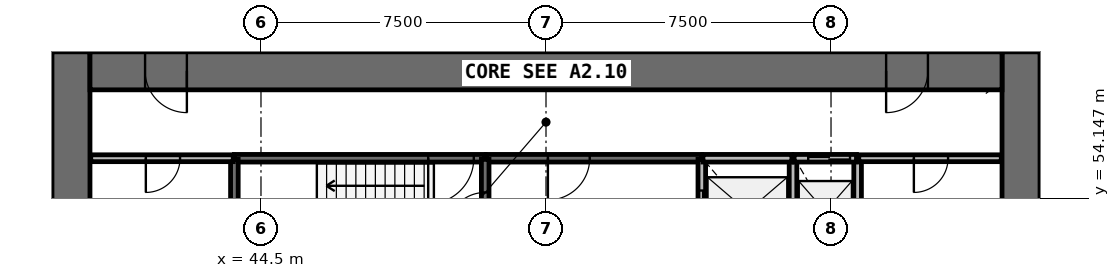
"""IFC4 building model, lengths in metres.
Left out: names, types, materials, properties, quantities, classifications, styles, units other than length and angle.
Written with IfcOpenShell. Run it as: python <this file> out.ifc"""

import sys

from ifc_helpers import new_model, si_unit, direction, frame, frame_2d, origin, place, context, subcontext, project, spatial, rectangle, extrude, source, transform, mapped, element, fill, save


model = new_model("IFC4")
c1 = context("Model", 3, precision=1e-05, world=origin(), true_north=direction((0.0, 1.0)))
c2 = subcontext(c1, "Body", "Model", "MODEL_VIEW")
j1 = project(units=[si_unit("LENGTHUNIT", "METRE"), si_unit("PLANEANGLEUNIT", "RADIAN")], contexts=[c1])
p1 = place(None, origin())
s1 = spatial("IfcSite", under=j1, at=p1, CompositionType="ELEMENT")
p2 = place(p1, origin())
s2 = spatial("IfcBuilding", under=s1, at=p2, CompositionType="ELEMENT")
p3 = place(p2, frame((0.0, 0.0, 40.2)))
s3 = spatial("IfcBuildingStorey", under=s2, at=p3, CompositionType="ELEMENT", Elevation=40.2)
p4 = place(p3, frame((64.5, 38.0, 0.0), z_axis=(0.0, 0.0, 1.0), x_axis=(0.0, 1.0, 0.0)))
e1 = element("IfcWall", 1, at=p4, inside=s3, PredefinedType="SHEAR", context=c2, shape_type="SweptSolid", body=[
    extrude(rectangle(XDim=20.0, YDim=1.0, at=frame_2d((10.0, 0.0))), origin(), (0.0, 0.0, 1.0), 4.4),
])
p5 = place(p4, frame((9.1, 0.0, 0.0)))
e2 = element("IfcOpeningElement", 2, at=p5, cuts=e1, PredefinedType="OPENING", context=c2, shape_type="SweptSolid", body=[
    extrude(rectangle(XDim=1.8, YDim=2.1, at=frame_2d((0.9, 1.05))), frame((0.0, 0.51, 0.0), z_axis=(0.0, -1.0, 0.0), x_axis=(1.0, 0.0, 0.0)), (0.0, 0.0, 1.0), 1.02),
])
p6 = place(p3, frame((39.5, 58.0, 0.0), z_axis=(0.0, 0.0, 1.0), x_axis=(0.0, -1.0, 0.0)))
e3 = element("IfcWall", 3, at=p6, inside=s3, PredefinedType="SHEAR", context=c2, shape_type="SweptSolid", body=[
    extrude(rectangle(XDim=20.0, YDim=1.0, at=frame_2d((10.0, 0.0))), origin(), (0.0, 0.0, 1.0), 4.4),
])
p7 = place(p6, frame((9.1, 0.0, 0.0)))
e4 = element("IfcOpeningElement", 4, at=p7, cuts=e3, PredefinedType="OPENING", context=c2, shape_type="SweptSolid", body=[
    extrude(rectangle(XDim=1.8, YDim=2.1, at=frame_2d((0.9, 1.05))), frame((0.0, 0.51, 0.0), z_axis=(0.0, -1.0, 0.0), x_axis=(1.0, 0.0, 0.0)), (0.0, 0.0, 1.0), 1.02),
])
p8 = place(p3, frame((64.0, 57.5, 0.0), z_axis=(0.0, 0.0, 1.0), x_axis=(-1.0, 0.0, 0.0)))
e5 = element("IfcWall", 5, at=p8, inside=s3, PredefinedType="SHEAR", context=c2, shape_type="SweptSolid", body=[
    extrude(rectangle(XDim=24.0, YDim=1.0, at=frame_2d((12.0, 0.0))), origin(), (0.0, 0.0, 1.0), 4.4),
])
p9 = place(p8, frame((21.45, 0.0, 0.0)))
e6 = element("IfcOpeningElement", 6, at=p9, cuts=e5, PredefinedType="OPENING", context=c2, shape_type="SweptSolid", body=[
    extrude(rectangle(XDim=1.1, YDim=2.1, at=frame_2d((0.55, 1.05))), frame((0.0, 0.51, 0.0), z_axis=(0.0, -1.0, 0.0), x_axis=(1.0, 0.0, 0.0)), (0.0, 0.0, 1.0), 1.02),
])
p10 = place(p8, frame((1.95, 0.0, 0.0)))
e7 = element("IfcOpeningElement", 7, at=p10, cuts=e5, PredefinedType="OPENING", context=c2, shape_type="SweptSolid", body=[
    extrude(rectangle(XDim=1.1, YDim=2.1, at=frame_2d((0.55, 1.05))), frame((0.0, 0.51, 0.0), z_axis=(0.0, -1.0, 0.0), x_axis=(1.0, 0.0, 0.0)), (0.0, 0.0, 1.0), 1.02),
])
p11 = place(p3, frame((50.4, 55.2, 0.0), z_axis=(0.0, 0.0, 1.0), x_axis=(-1.0, 0.0, 0.0)))
e8 = element("IfcWall", 8, at=p11, inside=s3, PredefinedType="SOLIDWALL", context=c2, shape_type="SweptSolid", body=[
    extrude(rectangle(XDim=6.6, YDim=0.2, at=frame_2d((3.3, 0.0))), origin(), (0.0, 0.0, 1.0), 3.95),
])
p12 = place(p11, frame((0.3, 0.0, 0.0)))
e9 = element("IfcOpeningElement", 9, at=p12, cuts=e8, PredefinedType="OPENING", context=c2, shape_type="SweptSolid", body=[
    extrude(rectangle(XDim=1.2, YDim=2.1, at=frame_2d((0.6, 1.05))), frame((0.0, 0.11, 0.0), z_axis=(0.0, -1.0, 0.0), x_axis=(1.0, 0.0, 0.0)), (0.0, 0.0, 1.0), 0.22),
])
p13 = place(p3, frame((56.1, 55.2, 0.0), z_axis=(0.0, 0.0, 1.0), x_axis=(-1.0, 0.0, 0.0)))
e10 = element("IfcWall", 10, at=p13, inside=s3, PredefinedType="SOLIDWALL", context=c2, shape_type="SweptSolid", body=[
    extrude(rectangle(XDim=5.67, YDim=0.2, at=frame_2d((2.835, 0.0))), origin(), (0.0, 0.0, 1.0), 3.95),
])
p14 = place(p13, frame((2.95, 0.0, 0.0)))
e11 = element("IfcOpeningElement", 11, at=p14, cuts=e10, PredefinedType="OPENING", context=c2, shape_type="SweptSolid", body=[
    extrude(rectangle(XDim=1.1, YDim=2.1, at=frame_2d((0.55, 1.05))), frame((0.0, 0.11, 0.0), z_axis=(0.0, -1.0, 0.0), x_axis=(1.0, 0.0, 0.0)), (0.0, 0.0, 1.0), 0.22),
])
p15 = place(p3, frame((50.4, 52.4, 0.0), z_axis=(0.0, 0.0, 1.0), x_axis=(0.0, 1.0, 0.0)))
e12 = element("IfcWall", 12, at=p15, inside=s3, PredefinedType="SOLIDWALL", context=c2, shape_type="SweptSolid", body=[
    extrude(rectangle(XDim=2.77, YDim=0.2, at=frame_2d((1.385, 0.0))), origin(), (0.0, 0.0, 1.0), 3.95),
])
p16 = place(p15, frame((0.9, 0.0, 0.0)))
e13 = element("IfcOpeningElement", 13, at=p16, cuts=e12, PredefinedType="OPENING", context=c2, shape_type="SweptSolid", body=[
    extrude(rectangle(XDim=1.0, YDim=2.1, at=frame_2d((0.5, 1.05))), frame((0.0, 0.11, 0.0), z_axis=(0.0, -1.0, 0.0), x_axis=(1.0, 0.0, 0.0)), (0.0, 0.0, 1.0), 0.22),
])
p17 = place(p3, frame((56.1, 55.17, 0.0), z_axis=(0.0, 0.0, 1.0), x_axis=(0.0, -1.0, 0.0)))
e14 = element("IfcWall", 14, at=p17, inside=s3, PredefinedType="SOLIDWALL", context=c2, shape_type="SweptSolid", body=[
    extrude(rectangle(XDim=2.77, YDim=0.2, at=frame_2d((1.385, 0.0))), origin(), (0.0, 0.0, 1.0), 3.95),
])
p18 = place(p17, frame((0.82, 0.0, 0.0)))
e15 = element("IfcOpeningElement", 15, at=p18, cuts=e14, PredefinedType="OPENING", context=c2, shape_type="SweptSolid", body=[
    extrude(rectangle(XDim=1.1, YDim=2.1, at=frame_2d((0.55, 1.05))), frame((0.0, 0.11, 0.0), z_axis=(0.0, -1.0, 0.0), x_axis=(1.0, 0.0, 0.0)), (0.0, 0.0, 1.0), 0.22),
])
for number, where, z_axis, x_axis in (
    (16, (58.5, 52.4, 0.0), (0.0, 0.0, 1.0), (0.0, 1.0, 0.0)),
    (17, (60.2, 52.4, 0.0), (0.0, 0.0, 1.0), (0.0, 1.0, 0.0)),
):
    element("IfcWall", number, at=place(p3, frame(where, z_axis=z_axis, x_axis=x_axis)), inside=s3, PredefinedType="SOLIDWALL", context=c2, shape_type="SweptSolid", body=[
        extrude(rectangle(XDim=2.8, YDim=0.2, at=frame_2d((1.4, 0.0))), origin(), (0.0, 0.0, 1.0), 3.95),
    ])
p19 = place(p3, frame((58.47, 55.2, 0.0), z_axis=(0.0, 0.0, 1.0), x_axis=(-1.0, 0.0, 0.0)))
e18 = element("IfcWall", 18, at=p19, inside=s3, PredefinedType="SOLIDWALL", context=c2, shape_type="SweptSolid", body=[
    extrude(rectangle(XDim=2.34, YDim=0.2, at=frame_2d((1.17, 0.0))), origin(), (0.0, 0.0, 1.0), 3.95),
])
p20 = place(p3, frame((43.8, 55.17, 0.0), z_axis=(0.0, 0.0, 1.0), x_axis=(0.0, -1.0, 0.0)))
e19 = element("IfcWall", 19, at=p20, inside=s3, PredefinedType="SOLIDWALL", context=c2, shape_type="SweptSolid", body=[
    extrude(rectangle(XDim=2.14, YDim=0.2, at=frame_2d((1.07, 0.0))), origin(), (0.0, 0.0, 1.0), 3.95),
])
p21 = place(p3, frame((60.17, 55.2, 0.0), z_axis=(0.0, 0.0, 1.0), x_axis=(-1.0, 0.0, 0.0)))
e20 = element("IfcWall", 20, at=p21, inside=s3, PredefinedType="SOLIDWALL", context=c2, shape_type="SweptSolid", body=[
    extrude(rectangle(XDim=1.64, YDim=0.2, at=frame_2d((0.82, 0.0))), origin(), (0.0, 0.0, 1.0), 3.95),
])
p22 = place(p21, frame((0.17, 0.0, 0.0)))
e21 = element("IfcOpeningElement", 21, at=p22, cuts=e20, PredefinedType="OPENING", context=c2, shape_type="SweptSolid", body=[
    extrude(rectangle(XDim=1.1, YDim=2.1, at=frame_2d((0.55, 1.05))), frame((0.0, 0.11, 0.0), z_axis=(0.0, -1.0, 0.0), x_axis=(1.0, 0.0, 0.0)), (0.0, 0.0, 1.0), 0.22),
])
p23 = place(p3, frame((43.77, 55.2, 0.0), z_axis=(0.0, 0.0, 1.0), x_axis=(-1.0, 0.0, 0.0)))
e22 = element("IfcWall", 22, at=p23, inside=s3, PredefinedType="PARTITIONING", context=c2, shape_type="SweptSolid", body=[
    extrude(rectangle(XDim=3.75, YDim=0.18, at=frame_2d((1.875, 0.0))), origin(), (0.0, 0.0, 1.0), 3.95),
])
p24 = place(p23, frame((1.4, 0.0, 0.0)))
e23 = element("IfcOpeningElement", 23, at=p24, cuts=e22, PredefinedType="OPENING", context=c2, shape_type="SweptSolid", body=[
    extrude(rectangle(XDim=0.9, YDim=2.1, at=frame_2d((0.45, 1.05))), frame((0.0, 0.1, 0.0), z_axis=(0.0, -1.0, 0.0), x_axis=(1.0, 0.0, 0.0)), (0.0, 0.0, 1.0), 0.2),
])
p25 = place(p3, frame((63.98, 55.2, 0.0), z_axis=(0.0, 0.0, 1.0), x_axis=(-1.0, 0.0, 0.0)))
e24 = element("IfcWall", 24, at=p25, inside=s3, PredefinedType="PARTITIONING", context=c2, shape_type="SweptSolid", body=[
    extrude(rectangle(XDim=3.75, YDim=0.18, at=frame_2d((1.875, 0.0))), origin(), (0.0, 0.0, 1.0), 3.95),
])
p26 = place(p25, frame((1.4, 0.0, 0.0)))
e25 = element("IfcOpeningElement", 25, at=p26, cuts=e24, PredefinedType="OPENING", context=c2, shape_type="SweptSolid", body=[
    extrude(rectangle(XDim=0.9, YDim=2.1, at=frame_2d((0.45, 1.05))), frame((0.0, 0.1, 0.0), z_axis=(0.0, -1.0, 0.0), x_axis=(1.0, 0.0, 0.0)), (0.0, 0.0, 1.0), 0.2),
])
m1 = source(origin(), c2, "Body", "SweptSolid", [
    extrude(rectangle(XDim=1.1, YDim=2.1, at=frame_2d((0.55, 1.05))), frame((0.0, 0.025, 0.0), z_axis=(0.0, -1.0, 0.0), x_axis=(1.0, 0.0, 0.0)), (0.0, 0.0, 1.0), 0.05),
])
p27 = place(p18, origin())
e26 = element("IfcDoor", 26, at=p27, inside=s3, OperationType="DOUBLE_DOOR_SLIDING", PredefinedType="USERDEFINED", context=c2, shape_type="MappedRepresentation", body=[
    mapped(m1, transform((0.0, 0.0, 0.0), scale=1.0)),
])
fill(e15, e26)
p28 = place(p22, origin())
e27 = element("IfcDoor", 27, at=p28, inside=s3, OperationType="DOUBLE_DOOR_SLIDING", PredefinedType="USERDEFINED", context=c2, shape_type="MappedRepresentation", body=[
    mapped(m1, transform((0.0, 0.0, 0.0), scale=1.0)),
])
fill(e21, e27)
m2 = source(origin(), c2, "Body", "SweptSolid", [
    extrude(rectangle(XDim=1.2, YDim=2.1, at=frame_2d((0.6, 1.05))), frame((0.0, 0.025, 0.0), z_axis=(0.0, -1.0, 0.0), x_axis=(1.0, 0.0, 0.0)), (0.0, 0.0, 1.0), 0.05),
])
p29 = place(p12, origin())
e28 = element("IfcDoor", 28, at=p29, inside=s3, OperationType="SINGLE_SWING_RIGHT", PredefinedType="DOOR", context=c2, shape_type="MappedRepresentation", body=[
    mapped(m2, transform((0.0, 0.0, 0.0), scale=1.0)),
])
fill(e9, e28)
m3 = source(origin(), c2, "Body", "SweptSolid", [
    extrude(rectangle(XDim=1.0, YDim=2.1, at=frame_2d((0.5, 1.05))), frame((0.0, 0.025, 0.0), z_axis=(0.0, -1.0, 0.0), x_axis=(1.0, 0.0, 0.0)), (0.0, 0.0, 1.0), 0.05),
])
p30 = place(p16, origin())
e29 = element("IfcDoor", 29, at=p30, inside=s3, OperationType="SINGLE_SWING_LEFT", PredefinedType="DOOR", context=c2, shape_type="MappedRepresentation", body=[
    mapped(m3, transform((0.0, 0.0, 0.0), scale=1.0)),
])
fill(e13, e29)
m4 = source(origin(), c2, "Body", "SweptSolid", [
    extrude(rectangle(XDim=1.1, YDim=2.1, at=frame_2d((0.55, 1.05))), frame((0.0, 0.025, 0.0), z_axis=(0.0, -1.0, 0.0), x_axis=(1.0, 0.0, 0.0)), (0.0, 0.0, 1.0), 0.05),
])
p31 = place(p14, origin())
e30 = element("IfcDoor", 30, at=p31, inside=s3, OperationType="SINGLE_SWING_RIGHT", PredefinedType="DOOR", context=c2, shape_type="MappedRepresentation", body=[
    mapped(m4, transform((0.0, 0.0, 0.0), scale=1.0)),
])
fill(e11, e30)
m5 = source(origin(), c2, "Body", "SweptSolid", [
    extrude(rectangle(XDim=1.1, YDim=2.1, at=frame_2d((0.55, 1.05))), frame((0.0, 0.025, 0.0), z_axis=(0.0, -1.0, 0.0), x_axis=(1.0, 0.0, 0.0)), (0.0, 0.0, 1.0), 0.05),
])
p32 = place(p9, origin())
e31 = element("IfcDoor", 31, at=p32, inside=s3, OperationType="SINGLE_SWING_LEFT", PredefinedType="DOOR", context=c2, shape_type="MappedRepresentation", body=[
    mapped(m5, transform((0.0, 0.0, 0.0), scale=1.0)),
])
fill(e6, e31)
p33 = place(p10, origin())
e32 = element("IfcDoor", 32, at=p33, inside=s3, OperationType="SINGLE_SWING_RIGHT", PredefinedType="DOOR", context=c2, shape_type="MappedRepresentation", body=[
    mapped(m5, transform((0.0, 0.0, 0.0), scale=1.0)),
])
fill(e7, e32)
m6 = source(origin(), c2, "Body", "SweptSolid", [
    extrude(rectangle(XDim=0.9, YDim=2.1, at=frame_2d((0.45, 1.05))), frame((0.0, 0.025, 0.0), z_axis=(0.0, -1.0, 0.0), x_axis=(1.0, 0.0, 0.0)), (0.0, 0.0, 1.0), 0.05),
])
p34 = place(p24, origin())
e33 = element("IfcDoor", 33, at=p34, inside=s3, OperationType="SINGLE_SWING_RIGHT", PredefinedType="DOOR", context=c2, shape_type="MappedRepresentation", body=[
    mapped(m6, transform((0.0, 0.0, 0.0), scale=1.0)),
])
fill(e23, e33)
p35 = place(p26, origin())
e34 = element("IfcDoor", 34, at=p35, inside=s3, OperationType="SINGLE_SWING_RIGHT", PredefinedType="DOOR", context=c2, shape_type="MappedRepresentation", body=[
    mapped(m6, transform((0.0, 0.0, 0.0), scale=1.0)),
])
fill(e25, e34)
save(model, sys.argv[1])
